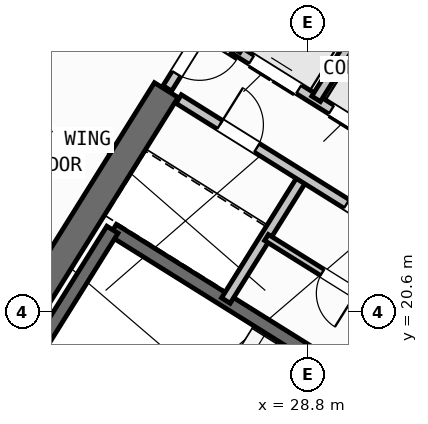
"""IFC4 building model, lengths in metres.
Left out: names, types, materials, properties, quantities, classifications, styles, units other than length and angle.
Written with IfcOpenShell. Run it as: python <this file> out.ifc"""

import sys

from ifc_helpers import new_model, si_unit, direction, frame, frame_2d, origin, place, context, subcontext, project, spatial, rectangle, extrude, source, transform, mapped, element, fill, save


model = new_model("IFC4")
c1 = context("Model", 3, precision=1e-05, world=origin(), true_north=direction((0.0, 1.0)))
c2 = subcontext(c1, "Body", "Model", "MODEL_VIEW")
j1 = project(units=[si_unit("LENGTHUNIT", "METRE"), si_unit("PLANEANGLEUNIT", "RADIAN")], contexts=[c1])
p1 = place(None, origin())
s1 = spatial("IfcSite", under=j1, at=p1, CompositionType="ELEMENT")
p2 = place(p1, origin())
s2 = spatial("IfcBuilding", under=s1, at=p2, CompositionType="ELEMENT")
p3 = place(p2, frame((0.0, 0.0, 144.3)))
s3 = spatial("IfcBuildingStorey", under=s2, at=p3, CompositionType="ELEMENT", Elevation=144.3)
p4 = place(p3, frame((40.573, 24.01, 0.0), z_axis=(0.0, 0.0, 1.0), x_axis=(-0.848047359947, 0.529920442413, 0.0)))
e1 = element("IfcWall", 1, at=p4, inside=s3, PredefinedType="SHEAR", context=c2, shape_type="SweptSolid", body=[
    extrude(rectangle(XDim=13.14, YDim=0.55, at=frame_2d((6.57, 0.0))), origin(), (0.0, 0.0, 1.0), 3.35),
])
p5 = place(p3, frame((26.007, 24.976, 0.0), z_axis=(0.0, 0.0, 1.0), x_axis=(-0.529923795287, -0.848045264823, 0.0)))
e2 = element("IfcWall", 2, at=p5, inside=s3, PredefinedType="SHEAR", context=c2, shape_type="SweptSolid", body=[
    extrude(rectangle(XDim=6.425, YDim=0.55, at=frame_2d((3.212, 0.0))), origin(), (0.0, 0.0, 1.0), 3.35),
])
p6 = place(p3, frame((29.268, 6.429, 0.0), z_axis=(0.0, 0.0, 1.0), x_axis=(-0.848049971435, 0.529916263149, 0.0)))
e3 = element("IfcWall", 3, at=p6, inside=s3, PredefinedType="STANDARD", context=c2, shape_type="SweptSolid", body=[
    extrude(rectangle(XDim=31.588, YDim=0.32, at=frame_2d((15.794, 0.0))), origin(), (0.0, 0.0, 1.0), 3.35),
])
p7 = place(p6, frame((16.362, 0.0, 0.0)))
e4 = element("IfcOpeningElement", 4, at=p7, cuts=e3, PredefinedType="OPENING", context=c2, shape_type="SweptSolid", body=[
    extrude(rectangle(XDim=1.2, YDim=2.15, at=frame_2d((0.6, 1.075))), frame((0.0, 0.17, 0.0), z_axis=(0.0, -1.0, 0.0), x_axis=(1.0, 0.0, 0.0)), (0.0, 0.0, 1.0), 0.34),
])
p8 = place(p6, frame((2.989, 0.0, 0.8)))
e5 = element("IfcOpeningElement", 5, at=p8, cuts=e3, PredefinedType="OPENING", context=c2, shape_type="SweptSolid", body=[
    extrude(rectangle(XDim=2.1, YDim=1.55, at=frame_2d((1.05, 0.775))), frame((0.0, 0.17, 0.0), z_axis=(0.0, -1.0, 0.0), x_axis=(1.0, 0.0, 0.0)), (0.0, 0.0, 1.0), 0.34),
])
p9 = place(p6, frame((8.359, 0.0, 0.8)))
e6 = element("IfcOpeningElement", 6, at=p9, cuts=e3, PredefinedType="OPENING", context=c2, shape_type="SweptSolid", body=[
    extrude(rectangle(XDim=2.1, YDim=1.55, at=frame_2d((1.05, 0.775))), frame((0.0, 0.17, 0.0), z_axis=(0.0, -1.0, 0.0), x_axis=(1.0, 0.0, 0.0)), (0.0, 0.0, 1.0), 0.34),
])
p10 = place(p6, frame((13.284, 0.0, 0.95)))
e7 = element("IfcOpeningElement", 7, at=p10, cuts=e3, PredefinedType="OPENING", context=c2, shape_type="SweptSolid", body=[
    extrude(rectangle(XDim=1.2, YDim=1.4, at=frame_2d((0.6, 0.7))), frame((0.0, 0.17, 0.0), z_axis=(0.0, -1.0, 0.0), x_axis=(1.0, 0.0, 0.0)), (0.0, 0.0, 1.0), 0.34),
])
p11 = place(p6, frame((29.188, 0.0, 0.95)))
e8 = element("IfcOpeningElement", 8, at=p11, cuts=e3, PredefinedType="OPENING", context=c2, shape_type="SweptSolid", body=[
    extrude(rectangle(XDim=1.2, YDim=1.4, at=frame_2d((0.6, 0.7))), frame((0.0, 0.17, 0.0), z_axis=(0.0, -1.0, 0.0), x_axis=(1.0, 0.0, 0.0)), (0.0, 0.0, 1.0), 0.34),
])
p12 = place(p6, frame((19.674, 0.0, 1.0)))
e9 = element("IfcOpeningElement", 9, at=p12, cuts=e3, PredefinedType="OPENING", context=c2, shape_type="SweptSolid", body=[
    extrude(rectangle(XDim=0.9, YDim=1.25, at=frame_2d((0.45, 0.625))), frame((0.0, 0.17, 0.0), z_axis=(0.0, -1.0, 0.0), x_axis=(1.0, 0.0, 0.0)), (0.0, 0.0, 1.0), 0.34),
])
p13 = place(p6, frame((21.896, 0.0, 1.0)))
e10 = element("IfcOpeningElement", 10, at=p13, cuts=e3, PredefinedType="OPENING", context=c2, shape_type="SweptSolid", body=[
    extrude(rectangle(XDim=0.9, YDim=1.25, at=frame_2d((0.45, 0.625))), frame((0.0, 0.17, 0.0), z_axis=(0.0, -1.0, 0.0), x_axis=(1.0, 0.0, 0.0)), (0.0, 0.0, 1.0), 0.34),
])
p14 = place(p6, frame((24.106, 0.0, 1.0)))
e11 = element("IfcOpeningElement", 11, at=p14, cuts=e3, PredefinedType="OPENING", context=c2, shape_type="SweptSolid", body=[
    extrude(rectangle(XDim=0.65, YDim=1.15, at=frame_2d((0.325, 0.575))), frame((0.0, 0.17, 0.0), z_axis=(0.0, -1.0, 0.0), x_axis=(1.0, 0.0, 0.0)), (0.0, 0.0, 1.0), 0.34),
])
p15 = place(p6, frame((26.366, 0.0, 1.0)))
e12 = element("IfcOpeningElement", 12, at=p15, cuts=e3, PredefinedType="OPENING", context=c2, shape_type="SweptSolid", body=[
    extrude(rectangle(XDim=0.9, YDim=1.25, at=frame_2d((0.45, 0.625))), frame((0.0, 0.17, 0.0), z_axis=(0.0, -1.0, 0.0), x_axis=(1.0, 0.0, 0.0)), (0.0, 0.0, 1.0), 0.34),
])
p16 = place(p3, frame((14.138, 41.825, 0.0), z_axis=(0.0, 0.0, 1.0), x_axis=(0.848046498049, -0.529921821731, 0.0)))
e13 = element("IfcWall", 13, at=p16, inside=s3, PredefinedType="STANDARD", context=c2, shape_type="SweptSolid", body=[
    extrude(rectangle(XDim=31.588, YDim=0.32, at=frame_2d((15.794, 0.0))), origin(), (0.0, 0.0, 1.0), 3.35),
])
p17 = place(p16, frame((2.949, 0.0, 0.0)))
e14 = element("IfcOpeningElement", 14, at=p17, cuts=e13, PredefinedType="OPENING", context=c2, shape_type="SweptSolid", body=[
    extrude(rectangle(XDim=1.05, YDim=2.15, at=frame_2d((0.525, 1.075))), frame((0.0, 0.17, 0.0), z_axis=(0.0, -1.0, 0.0), x_axis=(1.0, 0.0, 0.0)), (0.0, 0.0, 1.0), 0.34),
])
p18 = place(p16, frame((0.861, 0.0, 0.85)))
e15 = element("IfcOpeningElement", 15, at=p18, cuts=e13, PredefinedType="OPENING", context=c2, shape_type="SweptSolid", body=[
    extrude(rectangle(XDim=1.5, YDim=1.5, at=frame_2d((0.75, 0.75))), frame((0.0, 0.17, 0.0), z_axis=(0.0, -1.0, 0.0), x_axis=(1.0, 0.0, 0.0)), (0.0, 0.0, 1.0), 0.34),
])
p19 = place(p16, frame((8.494, 0.0, 0.85)))
e16 = element("IfcOpeningElement", 16, at=p19, cuts=e13, PredefinedType="OPENING", context=c2, shape_type="SweptSolid", body=[
    extrude(rectangle(XDim=1.8, YDim=1.5, at=frame_2d((0.9, 0.75))), frame((0.0, 0.17, 0.0), z_axis=(0.0, -1.0, 0.0), x_axis=(1.0, 0.0, 0.0)), (0.0, 0.0, 1.0), 0.34),
])
p20 = place(p16, frame((13.874, 0.0, 0.85)))
e17 = element("IfcOpeningElement", 17, at=p20, cuts=e13, PredefinedType="OPENING", context=c2, shape_type="SweptSolid", body=[
    extrude(rectangle(XDim=1.5, YDim=1.5, at=frame_2d((0.75, 0.75))), frame((0.0, 0.17, 0.0), z_axis=(0.0, -1.0, 0.0), x_axis=(1.0, 0.0, 0.0)), (0.0, 0.0, 1.0), 0.34),
])
p21 = place(p16, frame((17.104, 0.0, 1.0)))
e18 = element("IfcOpeningElement", 18, at=p21, cuts=e13, PredefinedType="OPENING", context=c2, shape_type="SweptSolid", body=[
    extrude(rectangle(XDim=0.9, YDim=1.25, at=frame_2d((0.45, 0.625))), frame((0.0, 0.17, 0.0), z_axis=(0.0, -1.0, 0.0), x_axis=(1.0, 0.0, 0.0)), (0.0, 0.0, 1.0), 0.34),
])
p22 = place(p16, frame((22.144, 0.0, 1.0)))
e19 = element("IfcOpeningElement", 19, at=p22, cuts=e13, PredefinedType="OPENING", context=c2, shape_type="SweptSolid", body=[
    extrude(rectangle(XDim=0.9, YDim=1.25, at=frame_2d((0.45, 0.625))), frame((0.0, 0.17, 0.0), z_axis=(0.0, -1.0, 0.0), x_axis=(1.0, 0.0, 0.0)), (0.0, 0.0, 1.0), 0.34),
])
p23 = place(p16, frame((27.744, 0.0, 1.0)))
e20 = element("IfcOpeningElement", 20, at=p23, cuts=e13, PredefinedType="OPENING", context=c2, shape_type="SweptSolid", body=[
    extrude(rectangle(XDim=0.9, YDim=1.25, at=frame_2d((0.45, 0.625))), frame((0.0, 0.17, 0.0), z_axis=(0.0, -1.0, 0.0), x_axis=(1.0, 0.0, 0.0)), (0.0, 0.0, 1.0), 0.34),
])
p24 = place(p3, frame((31.28, 18.261, 0.0), z_axis=(0.0, 0.0, 1.0), x_axis=(-0.848051618787, 0.529913626805, 0.0)))
e21 = element("IfcWall", 21, at=p24, inside=s3, PredefinedType="SHEAR", context=c2, shape_type="SweptSolid", body=[
    extrude(rectangle(XDim=7.46, YDim=0.26, at=frame_2d((3.73, 0.0))), origin(), (0.0, 0.0, 1.0), 3.35),
])
p25 = place(p24, frame((0.36, 0.0, 0.0)))
e22 = element("IfcOpeningElement", 22, at=p25, cuts=e21, PredefinedType="OPENING", context=c2, shape_type="SweptSolid", body=[
    extrude(rectangle(XDim=0.86, YDim=2.05, at=frame_2d((0.43, 1.025))), frame((0.0, 0.14, 0.0), z_axis=(0.0, -1.0, 0.0), x_axis=(1.0, 0.0, 0.0)), (0.0, 0.0, 1.0), 0.28),
])
p26 = place(p3, frame((24.945, 22.22, 0.0), z_axis=(0.0, 0.0, 1.0), x_axis=(-0.529908658664, -0.84805472316, 0.0)))
e23 = element("IfcWall", 23, at=p26, inside=s3, PredefinedType="SHEAR", context=c2, shape_type="SweptSolid", body=[
    extrude(rectangle(XDim=3.16, YDim=0.26, at=frame_2d((1.58, 0.0))), origin(), (0.0, 0.0, 1.0), 3.35),
])
p27 = place(p3, frame((31.822, 24.998, 0.0), z_axis=(0.0, 0.0, 1.0), x_axis=(-0.848036912365, 0.52993716162, 0.0)))
e24 = element("IfcWall", 24, at=p27, inside=s3, PredefinedType="STANDARD", context=c2, shape_type="SweptSolid", body=[
    extrude(rectangle(XDim=4.618, YDim=0.2, at=frame_2d((2.309, 0.0))), origin(), (0.0, 0.0, 1.0), 3.34),
])
p28 = place(p3, frame((32.108, 22.814, 0.0), z_axis=(0.0, 0.0, 1.0), x_axis=(-0.848042229521, 0.529928652696, 0.0)))
e25 = element("IfcWall", 25, at=p28, inside=s3, PredefinedType="STANDARD", context=c2, shape_type="SweptSolid", body=[
    extrude(rectangle(XDim=5.62, YDim=0.2, at=frame_2d((2.81, 0.0))), origin(), (0.0, 0.0, 1.0), 3.34),
])
p29 = place(p28, frame((0.39, 0.0, 0.0)))
e26 = element("IfcOpeningElement", 26, at=p29, cuts=e25, PredefinedType="OPENING", context=c2, shape_type="SweptSolid", body=[
    extrude(rectangle(XDim=1.1, YDim=2.15, at=frame_2d((0.55, 1.075))), frame((0.0, 0.11, 0.0), z_axis=(0.0, -1.0, 0.0), x_axis=(1.0, 0.0, 0.0)), (0.0, 0.0, 1.0), 0.22),
])
p30 = place(p28, frame((2.25, 0.0, 0.0)))
e27 = element("IfcOpeningElement", 27, at=p30, cuts=e25, PredefinedType="OPENING", context=c2, shape_type="SweptSolid", body=[
    extrude(rectangle(XDim=1.1, YDim=2.15, at=frame_2d((0.55, 1.075))), frame((0.0, 0.11, 0.0), z_axis=(0.0, -1.0, 0.0), x_axis=(1.0, 0.0, 0.0)), (0.0, 0.0, 1.0), 0.22),
])
p31 = place(p28, frame((4.11, 0.0, 0.0)))
e28 = element("IfcOpeningElement", 28, at=p31, cuts=e25, PredefinedType="OPENING", context=c2, shape_type="SweptSolid", body=[
    extrude(rectangle(XDim=1.1, YDim=2.15, at=frame_2d((0.55, 1.075))), frame((0.0, 0.11, 0.0), z_axis=(0.0, -1.0, 0.0), x_axis=(1.0, 0.0, 0.0)), (0.0, 0.0, 1.0), 0.22),
])
p32 = place(p3, frame((28.25, 27.17, 0.0), z_axis=(0.0, 0.0, 1.0), x_axis=(-0.529905827651, -0.848056492117, 0.0)))
e29 = element("IfcWall", 29, at=p32, inside=s3, PredefinedType="STANDARD", context=c2, shape_type="SweptSolid", body=[
    extrude(rectangle(XDim=1.65, YDim=0.2, at=frame_2d((0.825, 0.0))), origin(), (0.0, 0.0, 1.0), 3.34),
])
p33 = place(p3, frame((29.801, 26.142, 0.0), z_axis=(0.0, 0.0, 1.0), x_axis=(-0.529998940003, -0.847998304005, 0.0)))
e30 = element("IfcWall", 30, at=p33, inside=s3, PredefinedType="STANDARD", context=c2, shape_type="SweptSolid", body=[
    extrude(rectangle(XDim=1.58, YDim=0.2, at=frame_2d((0.79, 0.0))), origin(), (0.0, 0.0, 1.0), 3.34),
])
p34 = place(p3, frame((28.71, 23.263, 0.0), z_axis=(0.0, 0.0, 1.0), x_axis=(-0.529907497854, -0.848055448493, 0.0)))
e31 = element("IfcWall", 31, at=p34, inside=s3, PredefinedType="STANDARD", context=c2, shape_type="SweptSolid", body=[
    extrude(rectangle(XDim=2.88, YDim=0.2, at=frame_2d((1.44, 0.0))), origin(), (0.0, 0.0, 1.0), 3.34),
])
p35 = place(p3, frame((31.525, 21.504, 0.0), z_axis=(0.0, 0.0, 1.0), x_axis=(-0.848040211232, 0.529931882541, 0.0)))
e32 = element("IfcWall", 32, at=p35, inside=s3, PredefinedType="STANDARD", context=c2, shape_type="SweptSolid", body=[
    extrude(rectangle(XDim=6.218, YDim=0.2, at=frame_2d((3.109, 0.0))), origin(), (0.0, 0.0, 1.0), 3.34),
])
p36 = place(p35, frame((4.4, 0.0, 0.0)))
e33 = element("IfcOpeningElement", 33, at=p36, cuts=e32, PredefinedType="OPENING", context=c2, shape_type="SweptSolid", body=[
    extrude(rectangle(XDim=0.86, YDim=2.05, at=frame_2d((0.43, 1.025))), frame((0.0, 0.11, 0.0), z_axis=(0.0, -1.0, 0.0), x_axis=(1.0, 0.0, 0.0)), (0.0, 0.0, 1.0), 0.22),
])
p37 = place(p35, frame((1.45, 0.0, 0.0)))
e34 = element("IfcOpeningElement", 34, at=p37, cuts=e32, PredefinedType="OPENING", context=c2, shape_type="SweptSolid", body=[
    extrude(rectangle(XDim=0.86, YDim=2.05, at=frame_2d((0.43, 1.025))), frame((0.0, 0.11, 0.0), z_axis=(0.0, -1.0, 0.0), x_axis=(1.0, 0.0, 0.0)), (0.0, 0.0, 1.0), 0.22),
])
p38 = place(p3, frame((30.766, 20.327, 0.0), z_axis=(0.0, 0.0, 1.0), x_axis=(-0.848052663127, 0.529911955482, 0.0)))
e35 = element("IfcWall", 35, at=p38, inside=s3, PredefinedType="PLUMBINGWALL", context=c2, shape_type="SweptSolid", body=[
    extrude(rectangle(XDim=3.28, YDim=0.14, at=frame_2d((1.64, 0.0))), origin(), (0.0, 0.0, 1.0), 3.34),
])
p39 = place(p38, frame((1.2, 0.0, 0.0)))
e36 = element("IfcOpeningElement", 36, at=p39, cuts=e35, PredefinedType="OPENING", context=c2, shape_type="SweptSolid", body=[
    extrude(rectangle(XDim=0.78, YDim=2.05, at=frame_2d((0.39, 1.025))), frame((0.0, 0.08, 0.0), z_axis=(0.0, -1.0, 0.0), x_axis=(1.0, 0.0, 0.0)), (0.0, 0.0, 1.0), 0.16),
])
p40 = place(p3, frame((27.596, 27.52, 0.0), z_axis=(0.0, 0.0, 1.0), x_axis=(-0.529865479138, -0.848081702443, 0.0)))
e37 = element("IfcWall", 37, at=p40, inside=s3, PredefinedType="STANDARD", context=c2, shape_type="SweptSolid", body=[
    extrude(rectangle(XDim=2.96, YDim=0.2, at=frame_2d((1.48, 0.0))), origin(), (0.0, 0.0, 1.0), 3.34),
])
p41 = place(p40, frame((1.76, 0.0, 0.0)))
e38 = element("IfcOpeningElement", 38, at=p41, cuts=e37, PredefinedType="OPENING", context=c2, shape_type="SweptSolid", body=[
    extrude(rectangle(XDim=0.86, YDim=2.05, at=frame_2d((0.43, 1.025))), frame((0.0, 0.11, 0.0), z_axis=(0.0, -1.0, 0.0), x_axis=(1.0, 0.0, 0.0)), (0.0, 0.0, 1.0), 0.22),
])
p42 = place(p3, frame((27.953, 33.016, 0.0), z_axis=(0.0, 0.0, 1.0), x_axis=(-0.529903001606, -0.848058257957, 0.0)))
e39 = element("IfcWall", 39, at=p42, inside=s3, PredefinedType="PARTITIONING", context=c2, shape_type="SweptSolid", body=[
    extrude(rectangle(XDim=9.15, YDim=0.16, at=frame_2d((4.575, 0.0))), origin(), (0.0, 0.0, 1.0), 3.34),
])
m1 = source(origin(), c2, "Body", "SweptSolid", [
    extrude(rectangle(XDim=1.1, YDim=2.15, at=frame_2d((0.55, 1.075))), frame((0.0, 0.025, 0.0), z_axis=(0.0, -1.0, 0.0), x_axis=(1.0, 0.0, 0.0)), (0.0, 0.0, 1.0), 0.05),
])
p43 = place(p30, origin())
e40 = element("IfcDoor", 40, at=p43, inside=s3, OperationType="DOUBLE_DOOR_SLIDING", PredefinedType="DOOR", context=c2, shape_type="MappedRepresentation", body=[
    mapped(m1, transform((0.0, 0.0, 0.0), scale=1.0)),
])
fill(e27, e40)
p44 = place(p31, origin())
e41 = element("IfcDoor", 41, at=p44, inside=s3, OperationType="DOUBLE_DOOR_SLIDING", PredefinedType="DOOR", context=c2, shape_type="MappedRepresentation", body=[
    mapped(m1, transform((0.0, 0.0, 0.0), scale=1.0)),
])
fill(e28, e41)
m2 = source(origin(), c2, "Body", "SweptSolid", [
    extrude(rectangle(XDim=0.86, YDim=2.05, at=frame_2d((0.43, 1.025))), frame((0.0, 0.025, 0.0), z_axis=(0.0, -1.0, 0.0), x_axis=(1.0, 0.0, 0.0)), (0.0, 0.0, 1.0), 0.05),
])
p45 = place(p36, frame((0.86, 0.0, 0.0), z_axis=(0.0, 0.0, 1.0), x_axis=(-1.0, 0.0, 0.0)))
e42 = element("IfcDoor", 42, at=p45, inside=s3, OperationType="SINGLE_SWING_LEFT", PredefinedType="DOOR", context=c2, shape_type="MappedRepresentation", body=[
    mapped(m2, transform((0.0, 0.0, 0.0), scale=1.0)),
])
fill(e33, e42)
p46 = place(p37, frame((0.86, 0.0, 0.0), z_axis=(0.0, 0.0, 1.0), x_axis=(-1.0, 0.0, 0.0)))
e43 = element("IfcDoor", 43, at=p46, inside=s3, OperationType="SINGLE_SWING_RIGHT", PredefinedType="DOOR", context=c2, shape_type="MappedRepresentation", body=[
    mapped(m2, transform((0.0, 0.0, 0.0), scale=1.0)),
])
fill(e34, e43)
m3 = source(origin(), c2, "Body", "SweptSolid", [
    extrude(rectangle(XDim=0.78, YDim=2.05, at=frame_2d((0.39, 1.025))), frame((0.0, 0.025, 0.0), z_axis=(0.0, -1.0, 0.0), x_axis=(1.0, 0.0, 0.0)), (0.0, 0.0, 1.0), 0.05),
])
p47 = place(p39, origin())
e44 = element("IfcDoor", 44, at=p47, inside=s3, OperationType="SINGLE_SWING_LEFT", PredefinedType="DOOR", context=c2, shape_type="MappedRepresentation", body=[
    mapped(m3, transform((0.0, 0.0, 0.0), scale=1.0)),
])
fill(e36, e44)
p48 = place(p41, origin())
e45 = element("IfcDoor", 45, at=p48, inside=s3, OperationType="SINGLE_SWING_LEFT", PredefinedType="DOOR", context=c2, shape_type="MappedRepresentation", body=[
    mapped(m2, transform((0.0, 0.0, 0.0), scale=1.0)),
])
fill(e38, e45)
save(model, sys.argv[1])
